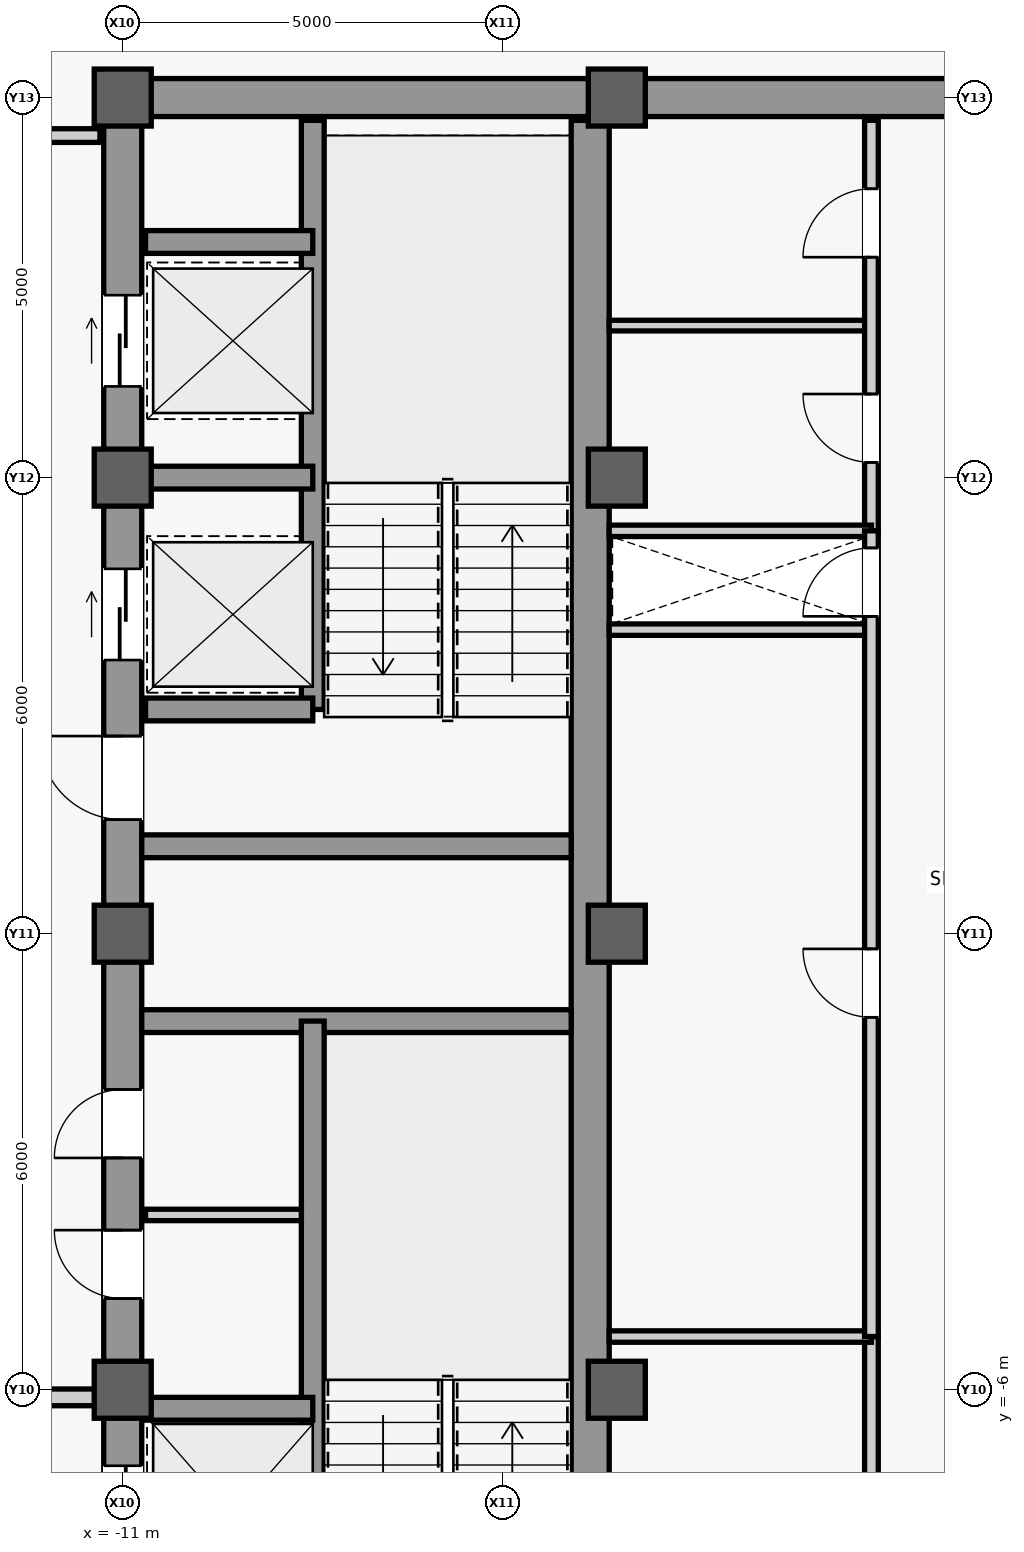
"""IFC4 building model, lengths in metres.
Left out: names, types, materials, properties, quantities, classifications, styles, units other than length and angle.
Written with IfcOpenShell. Run it as: python <this file> out.ifc"""

import sys

from ifc_helpers import new_model, si_unit, direction, frame, frame_2d, origin, origin_2d, place, context, subcontext, project, spatial, rectangle, extrude, source, transform, mapped, element, fill, save


model = new_model("IFC4")
c1 = context("Model", 3, precision=1e-05, world=origin(), true_north=direction((0.0, 1.0)))
c2 = subcontext(c1, "Body", "Model", "MODEL_VIEW")
j1 = project(units=[si_unit("LENGTHUNIT", "METRE"), si_unit("PLANEANGLEUNIT", "RADIAN")], contexts=[c1])
p1 = place(None, origin())
s1 = spatial("IfcSite", under=j1, at=p1, CompositionType="ELEMENT")
p2 = place(p1, origin())
s2 = spatial("IfcBuilding", under=s1, at=p2, CompositionType="ELEMENT")
p3 = place(p2, frame((0.0, 0.0, 342.3)))
s3 = spatial("IfcBuildingStorey", under=s2, at=p3, CompositionType="ELEMENT", Elevation=342.3)
m1 = source(origin(), c2, "Body", "SweptSolid", [
    extrude(rectangle(XDim=22.0, YDim=0.5, at=frame_2d((11.0, 0.0))), origin(), (0.0, 0.0, 1.0), 3.7),
])
p4 = place(p3, frame((-11.0, -11.0, 0.0), z_axis=(0.0, 0.0, 1.0), x_axis=(0.0, 1.0, 0.0)))
e1 = element("IfcWall", 1, at=p4, inside=s3, PredefinedType="SHEAR", context=c2, shape_type="MappedRepresentation", body=[
    mapped(m1, transform((0.0, 0.0, 0.0), scale=1.0)),
])
m2 = source(origin(), c2, "Body", "SweptSolid", [
    extrude(rectangle(XDim=1.1, YDim=2.2, at=frame_2d((0.55, 1.1))), frame((0.0, 0.26, 0.0), z_axis=(0.0, -1.0, 0.0), x_axis=(1.0, 0.0, 0.0)), (0.0, 0.0, 1.0), 0.52),
])
p5 = place(p4, frame((0.8, 0.0, 0.0)))
e2 = element("IfcOpeningElement", 2, at=p5, cuts=e1, PredefinedType="OPENING", context=c2, shape_type="MappedRepresentation", body=[
    mapped(m2, transform((0.0, 0.0, 0.0), scale=1.0)),
])
p6 = place(p4, frame((12.5, 0.0, 0.0)))
e3 = element("IfcOpeningElement", 3, at=p6, cuts=e1, PredefinedType="OPENING", context=c2, shape_type="MappedRepresentation", body=[
    mapped(m2, transform((0.0, 0.0, 0.0), scale=1.0)),
])
m3 = source(origin(), c2, "Body", "SweptSolid", [
    extrude(rectangle(XDim=0.9, YDim=2.15, at=frame_2d((0.45, 1.075))), frame((0.0, 0.26, 0.0), z_axis=(0.0, -1.0, 0.0), x_axis=(1.0, 0.0, 0.0)), (0.0, 0.0, 1.0), 0.52),
])
p7 = place(p4, frame((6.2, 0.0, 0.0)))
e4 = element("IfcOpeningElement", 4, at=p7, cuts=e1, PredefinedType="OPENING", context=c2, shape_type="MappedRepresentation", body=[
    mapped(m3, transform((0.0, 0.0, 0.0), scale=1.0)),
])
p8 = place(p4, frame((8.05, 0.0, 0.0)))
e5 = element("IfcOpeningElement", 5, at=p8, cuts=e1, PredefinedType="OPENING", context=c2, shape_type="MappedRepresentation", body=[
    mapped(m3, transform((0.0, 0.0, 0.0), scale=1.0)),
])
m4 = source(origin(), c2, "Body", "SweptSolid", [
    extrude(rectangle(XDim=1.2, YDim=2.3, at=frame_2d((0.6, 1.15))), frame((0.0, 0.26, 0.0), z_axis=(0.0, -1.0, 0.0), x_axis=(1.0, 0.0, 0.0)), (0.0, 0.0, 1.0), 0.52),
])
p9 = place(p4, frame((14.6, 0.0, 0.0)))
e6 = element("IfcOpeningElement", 6, at=p9, cuts=e1, PredefinedType="OPENING", context=c2, shape_type="MappedRepresentation", body=[
    mapped(m4, transform((0.0, 0.0, 0.0), scale=1.0)),
])
p10 = place(p4, frame((18.2, 0.0, 0.0)))
e7 = element("IfcOpeningElement", 7, at=p10, cuts=e1, PredefinedType="OPENING", context=c2, shape_type="MappedRepresentation", body=[
    mapped(m4, transform((0.0, 0.0, 0.0), scale=1.0)),
])
m5 = source(origin(), c2, "Body", "SweptSolid", [
    extrude(rectangle(XDim=1.3, YDim=2.3, at=frame_2d((0.65, 1.15))), frame((0.0, 0.26, 0.0), z_axis=(0.0, -1.0, 0.0), x_axis=(1.0, 0.0, 0.0)), (0.0, 0.0, 1.0), 0.52),
])
p11 = place(p4, frame((2.7, 0.0, 0.0)))
e8 = element("IfcOpeningElement", 8, at=p11, cuts=e1, PredefinedType="OPENING", context=c2, shape_type="MappedRepresentation", body=[
    mapped(m5, transform((0.0, 0.0, 0.0), scale=1.0)),
])
m6 = source(origin(), c2, "Body", "SweptSolid", [
    extrude(rectangle(XDim=21.4, YDim=0.5, at=frame_2d((10.7, 0.0))), origin(), (0.0, 0.0, 1.0), 3.7),
])
p12 = place(p3, frame((-4.85, -10.7, 0.0), z_axis=(0.0, 0.0, 1.0), x_axis=(0.0, 1.0, 0.0)))
e9 = element("IfcWall", 9, at=p12, inside=s3, PredefinedType="SHEAR", context=c2, shape_type="MappedRepresentation", body=[
    mapped(m6, transform((0.0, 0.0, 0.0), scale=1.0)),
])
m7 = source(origin(), c2, "Body", "SweptSolid", [
    extrude(rectangle(XDim=5.9, YDim=0.5, at=frame_2d((2.95, 0.0))), origin(), (0.0, 0.0, 1.0), 3.7),
])
p13 = place(p3, frame((-10.75, 11.0, 0.0), z_axis=(0.0, 0.0, 1.0), x_axis=(1.0, 0.0, 0.0)))
e10 = element("IfcWall", 10, at=p13, inside=s3, PredefinedType="SHEAR", context=c2, shape_type="MappedRepresentation", body=[
    mapped(m7, transform((0.0, 0.0, 0.0), scale=1.0)),
])
m8 = source(origin(), c2, "Body", "SweptSolid", [
    extrude(rectangle(XDim=5.65, YDim=0.3, at=frame_2d((2.825, 0.0))), origin(), (0.0, 0.0, 1.0), 3.7),
])
for number, where, z_axis, x_axis in (
    (11, (-10.75, -1.15, 0.0), (0.0, 0.0, 1.0), (1.0, 0.0, 0.0)),
    (12, (-10.75, 1.15, 0.0), (0.0, 0.0, 1.0), (1.0, 0.0, 0.0)),
):
    element("IfcWall", number, at=place(p3, frame(where, z_axis=z_axis, x_axis=x_axis)), inside=s3, PredefinedType="SHEAR", context=c2, shape_type="MappedRepresentation", body=[
        mapped(m8, transform((0.0, 0.0, 0.0), scale=1.0)),
    ])
m9 = source(origin(), c2, "Body", "SweptSolid", [
    extrude(rectangle(XDim=9.2, YDim=0.5, at=frame_2d((4.6, 0.0))), origin(), (0.0, 0.0, 1.0), 3.7),
])
p14 = place(p3, frame((-4.6, 11.0, 0.0), z_axis=(0.0, 0.0, 1.0), x_axis=(1.0, 0.0, 0.0)))
e13 = element("IfcWall", 13, at=p14, inside=s3, PredefinedType="SHEAR", context=c2, shape_type="MappedRepresentation", body=[
    mapped(m9, transform((0.0, 0.0, 0.0), scale=1.0)),
])
m10 = source(origin(), c2, "Body", "SweptSolid", [
    extrude(rectangle(XDim=0.75, YDim=0.75, at=origin_2d()), origin(), (0.0, 0.0, 1.0), 4.0),
])
for number, where, z_axis, x_axis in (
    (14, (-11.0, -6.0, 0.0), (0.0, 0.0, 1.0), (1.0, 0.0, 0.0)),
    (15, (-11.0, 0.0, 0.0), (0.0, 0.0, 1.0), (1.0, 0.0, 0.0)),
    (16, (-11.0, 6.0, 0.0), (0.0, 0.0, 1.0), (1.0, 0.0, 0.0)),
    (17, (-11.0, 11.0, 0.0), (0.0, 0.0, 1.0), (1.0, 0.0, 0.0)),
    (18, (-4.5, -6.0, 0.0), (0.0, 0.0, 1.0), (1.0, 0.0, 0.0)),
    (19, (-4.5, 0.0, 0.0), (0.0, 0.0, 1.0), (1.0, 0.0, 0.0)),
    (20, (-4.5, 6.0, 0.0), (0.0, 0.0, 1.0), (1.0, 0.0, 0.0)),
    (21, (-4.5, 11.0, 0.0), (0.0, 0.0, 1.0), (1.0, 0.0, 0.0)),
):
    element("IfcColumn", number, at=place(p3, frame(where, z_axis=z_axis, x_axis=x_axis)), inside=s3, PredefinedType="COLUMN", context=c2, shape_type="MappedRepresentation", body=[
        mapped(m10, transform((0.0, 0.0, 0.0), scale=1.0)),
    ])
m11 = source(origin(), c2, "Body", "SweptSolid", [
    extrude(rectangle(XDim=7.8, YDim=0.3, at=frame_2d((3.9, 0.0))), origin(), (0.0, 0.0, 1.0), 3.7),
])
p15 = place(p3, frame((-8.5, -8.95, 0.0), z_axis=(0.0, 0.0, 1.0), x_axis=(0.0, 1.0, 0.0)))
e22 = element("IfcWall", 22, at=p15, inside=s3, PredefinedType="SHEAR", context=c2, shape_type="MappedRepresentation", body=[
    mapped(m11, transform((0.0, 0.0, 0.0), scale=1.0)),
])
m12 = source(origin(), c2, "Body", "SweptSolid", [
    extrude(rectangle(XDim=2.2, YDim=0.3, at=frame_2d((1.1, 0.0))), origin(), (0.0, 0.0, 1.0), 3.7),
])
p16 = place(p3, frame((-10.7, -6.25, 0.0), z_axis=(0.0, 0.0, 1.0), x_axis=(1.0, 0.0, 0.0)))
e23 = element("IfcWall", 23, at=p16, inside=s3, PredefinedType="SHEAR", context=c2, shape_type="MappedRepresentation", body=[
    mapped(m12, transform((0.0, 0.0, 0.0), scale=1.0)),
])
m13 = source(origin(), c2, "Body", "SweptSolid", [
    extrude(rectangle(XDim=7.75, YDim=0.3, at=frame_2d((3.875, 0.0))), origin(), (0.0, 0.0, 1.0), 3.7),
])
p17 = place(p3, frame((-8.5, 2.95, 0.0), z_axis=(0.0, 0.0, 1.0), x_axis=(0.0, 1.0, 0.0)))
e24 = element("IfcWall", 24, at=p17, inside=s3, PredefinedType="SHEAR", context=c2, shape_type="MappedRepresentation", body=[
    mapped(m13, transform((0.0, 0.0, 0.0), scale=1.0)),
])
for number, where, z_axis, x_axis in (
    (25, (-10.7, 2.95, 0.0), (0.0, 0.0, 1.0), (1.0, 0.0, 0.0)),
    (26, (-10.7, 6.0, 0.0), (0.0, 0.0, 1.0), (1.0, 0.0, 0.0)),
    (27, (-10.7, 9.1, 0.0), (0.0, 0.0, 1.0), (1.0, 0.0, 0.0)),
):
    element("IfcWall", number, at=place(p3, frame(where, z_axis=z_axis, x_axis=x_axis)), inside=s3, PredefinedType="SHEAR", context=c2, shape_type="MappedRepresentation", body=[
        mapped(m12, transform((0.0, 0.0, 0.0), scale=1.0)),
    ])
m14 = source(origin(), c2, "Body", "SweptSolid", [
    extrude(rectangle(XDim=2.05, YDim=0.15, at=frame_2d((1.025, 0.0))), origin(), (0.0, 0.0, 1.0), 3.7),
])
p18 = place(p3, frame((-10.7, -3.7, 0.0), z_axis=(0.0, 0.0, 1.0), x_axis=(1.0, 0.0, 0.0)))
e28 = element("IfcWall", 28, at=p18, inside=s3, PredefinedType="PARTITIONING", context=c2, shape_type="MappedRepresentation", body=[
    mapped(m14, transform((0.0, 0.0, 0.0), scale=1.0)),
])
m15 = source(origin(), c2, "Body", "SweptSolid", [
    extrude(rectangle(XDim=4.05, YDim=0.22, at=frame_2d((2.025, 0.0))), origin(), (0.0, 0.0, 1.0), 3.084),
])
p19 = place(p3, frame((-15.35, -6.1, 0.0), z_axis=(0.0, 0.0, 1.0), x_axis=(1.0, 0.0, 0.0)))
e29 = element("IfcWall", 29, at=p19, inside=s3, PredefinedType="PARTITIONING", context=c2, shape_type="MappedRepresentation", body=[
    mapped(m15, transform((0.0, 0.0, 0.0), scale=1.0)),
])
m16 = source(origin(), c2, "Body", "SweptSolid", [
    extrude(rectangle(XDim=4.05, YDim=0.18, at=frame_2d((2.025, 0.0))), origin(), (0.0, 0.0, 1.0), 3.7),
])
p20 = place(p3, frame((-15.35, 10.5, 0.0), z_axis=(0.0, 0.0, 1.0), x_axis=(1.0, 0.0, 0.0)))
e30 = element("IfcWall", 30, at=p20, inside=s3, PredefinedType="PARTITIONING", context=c2, shape_type="MappedRepresentation", body=[
    mapped(m16, transform((0.0, 0.0, 0.0), scale=1.0)),
])
m17 = source(origin(), c2, "Body", "SweptSolid", [
    extrude(rectangle(XDim=3.45, YDim=0.15, at=frame_2d((1.725, 0.0))), origin(), (0.0, 0.0, 1.0), 3.7),
])
p21 = place(p3, frame((-4.6, 4.0, 0.0), z_axis=(0.0, 0.0, 1.0), x_axis=(1.0, 0.0, 0.0)))
e31 = element("IfcWall", 31, at=p21, inside=s3, PredefinedType="PARTITIONING", context=c2, shape_type="MappedRepresentation", body=[
    mapped(m17, transform((0.0, 0.0, 0.0), scale=1.0)),
])
m18 = source(origin(), c2, "Body", "SweptSolid", [
    extrude(rectangle(XDim=5.4, YDim=0.18, at=frame_2d((2.7, 0.0))), origin(), (0.0, 0.0, 1.0), 3.7),
])
p22 = place(p3, frame((-1.15, -10.7, 0.0), z_axis=(0.0, 0.0, 1.0), x_axis=(0.0, 1.0, 0.0)))
e32 = element("IfcWall", 32, at=p22, inside=s3, PredefinedType="PARTITIONING", context=c2, shape_type="MappedRepresentation", body=[
    mapped(m18, transform((0.0, 0.0, 0.0), scale=1.0)),
])
m19 = source(origin(), c2, "Body", "SweptSolid", [
    extrude(rectangle(XDim=0.9, YDim=2.15, at=frame_2d((0.45, 1.075))), frame((0.0, 0.1, 0.0), z_axis=(0.0, -1.0, 0.0), x_axis=(1.0, 0.0, 0.0)), (0.0, 0.0, 1.0), 0.2),
])
p23 = place(p22, frame((2.25, 0.0, 0.0)))
e33 = element("IfcOpeningElement", 33, at=p23, cuts=e32, PredefinedType="OPENING", context=c2, shape_type="MappedRepresentation", body=[
    mapped(m19, transform((0.0, 0.0, 0.0), scale=1.0)),
])
p24 = place(p3, frame((-4.6, -5.3, 0.0), z_axis=(0.0, 0.0, 1.0), x_axis=(1.0, 0.0, 0.0)))
e34 = element("IfcWall", 34, at=p24, inside=s3, PredefinedType="PARTITIONING", context=c2, shape_type="MappedRepresentation", body=[
    mapped(m17, transform((0.0, 0.0, 0.0), scale=1.0)),
])
m20 = source(origin(), c2, "Body", "SweptSolid", [
    extrude(rectangle(XDim=3.45, YDim=0.14, at=frame_2d((1.725, 0.0))), origin(), (0.0, 0.0, 1.0), 3.7),
])
p25 = place(p3, frame((-4.6, 8.0, 0.0), z_axis=(0.0, 0.0, 1.0), x_axis=(1.0, 0.0, 0.0)))
e35 = element("IfcWall", 35, at=p25, inside=s3, PredefinedType="PARTITIONING", context=c2, shape_type="MappedRepresentation", body=[
    mapped(m20, transform((0.0, 0.0, 0.0), scale=1.0)),
])
p26 = place(p3, frame((-1.15, 5.3, 0.0), z_axis=(0.0, 0.0, 1.0), x_axis=(0.0, 1.0, 0.0)))
e36 = element("IfcWall", 36, at=p26, inside=s3, PredefinedType="PARTITIONING", context=c2, shape_type="MappedRepresentation", body=[
    mapped(m18, transform((0.0, 0.0, 0.0), scale=1.0)),
])
p27 = place(p26, frame((0.9, 0.0, 0.0)))
e37 = element("IfcOpeningElement", 37, at=p27, cuts=e36, PredefinedType="OPENING", context=c2, shape_type="MappedRepresentation", body=[
    mapped(m19, transform((0.0, 0.0, 0.0), scale=1.0)),
])
p28 = place(p26, frame((3.6, 0.0, 0.0)))
e38 = element("IfcOpeningElement", 38, at=p28, cuts=e36, PredefinedType="OPENING", context=c2, shape_type="MappedRepresentation", body=[
    mapped(m19, transform((0.0, 0.0, 0.0), scale=1.0)),
])
p29 = place(p3, frame((-4.6, 5.3, 0.0), z_axis=(0.0, 0.0, 1.0), x_axis=(1.0, 0.0, 0.0)))
e39 = element("IfcWall", 39, at=p29, inside=s3, PredefinedType="PARTITIONING", context=c2, shape_type="MappedRepresentation", body=[
    mapped(m17, transform((0.0, 0.0, 0.0), scale=1.0)),
])
m21 = source(origin(), c2, "Body", "SweptSolid", [
    extrude(rectangle(XDim=10.6, YDim=0.18, at=frame_2d((5.3, 0.0))), origin(), (0.0, 0.0, 1.0), 3.7),
])
p30 = place(p3, frame((-1.15, -5.3, 0.0), z_axis=(0.0, 0.0, 1.0), x_axis=(0.0, 1.0, 0.0)))
e40 = element("IfcWall", 40, at=p30, inside=s3, PredefinedType="PARTITIONING", context=c2, shape_type="MappedRepresentation", body=[
    mapped(m21, transform((0.0, 0.0, 0.0), scale=1.0)),
])
p31 = place(p30, frame((4.2, 0.0, 0.0)))
e41 = element("IfcOpeningElement", 41, at=p31, cuts=e40, PredefinedType="OPENING", context=c2, shape_type="MappedRepresentation", body=[
    mapped(m19, transform((0.0, 0.0, 0.0), scale=1.0)),
])
p32 = place(p30, frame((9.475, 0.0, 0.0)))
e42 = element("IfcOpeningElement", 42, at=p32, cuts=e40, PredefinedType="OPENING", context=c2, shape_type="MappedRepresentation", body=[
    mapped(m19, transform((0.0, 0.0, 0.0), scale=1.0)),
])
m22 = source(origin(), c2, "Body", "SweptSolid", [
    extrude(rectangle(XDim=1.1, YDim=2.2, at=frame_2d((0.55, 1.1))), frame((0.0, 0.025, 0.0), z_axis=(0.0, -1.0, 0.0), x_axis=(1.0, 0.0, 0.0)), (0.0, 0.0, 1.0), 0.05),
])
p33 = place(p6, origin())
e43 = element("IfcDoor", 43, at=p33, inside=s3, OperationType="SINGLE_SWING_RIGHT", PredefinedType="DOOR", context=c2, shape_type="MappedRepresentation", body=[
    mapped(m22, transform((0.0, 0.0, 0.0), scale=1.0)),
])
fill(e3, e43)
m23 = source(origin(), c2, "Body", "SweptSolid", [
    extrude(rectangle(XDim=0.9, YDim=2.15, at=frame_2d((0.45, 1.075))), frame((0.0, 0.025, 0.0), z_axis=(0.0, -1.0, 0.0), x_axis=(1.0, 0.0, 0.0)), (0.0, 0.0, 1.0), 0.05),
])
p34 = place(p7, origin())
e44 = element("IfcDoor", 44, at=p34, inside=s3, OperationType="SINGLE_SWING_RIGHT", PredefinedType="DOOR", context=c2, shape_type="MappedRepresentation", body=[
    mapped(m23, transform((0.0, 0.0, 0.0), scale=1.0)),
])
fill(e4, e44)
p35 = place(p8, origin())
e45 = element("IfcDoor", 45, at=p35, inside=s3, OperationType="SINGLE_SWING_LEFT", PredefinedType="DOOR", context=c2, shape_type="MappedRepresentation", body=[
    mapped(m23, transform((0.0, 0.0, 0.0), scale=1.0)),
])
fill(e5, e45)
p36 = place(p27, origin())
e46 = element("IfcDoor", 46, at=p36, inside=s3, OperationType="SINGLE_SWING_RIGHT", PredefinedType="DOOR", context=c2, shape_type="MappedRepresentation", body=[
    mapped(m23, transform((0.0, 0.0, 0.0), scale=1.0)),
])
fill(e37, e46)
p37 = place(p28, origin())
e47 = element("IfcDoor", 47, at=p37, inside=s3, OperationType="SINGLE_SWING_LEFT", PredefinedType="DOOR", context=c2, shape_type="MappedRepresentation", body=[
    mapped(m23, transform((0.0, 0.0, 0.0), scale=1.0)),
])
fill(e38, e47)
p38 = place(p31, origin())
e48 = element("IfcDoor", 48, at=p38, inside=s3, OperationType="SINGLE_SWING_RIGHT", PredefinedType="DOOR", context=c2, shape_type="MappedRepresentation", body=[
    mapped(m23, transform((0.0, 0.0, 0.0), scale=1.0)),
])
fill(e41, e48)
p39 = place(p32, origin())
e49 = element("IfcDoor", 49, at=p39, inside=s3, OperationType="SINGLE_SWING_LEFT", PredefinedType="DOOR", context=c2, shape_type="MappedRepresentation", body=[
    mapped(m23, transform((0.0, 0.0, 0.0), scale=1.0)),
])
fill(e42, e49)
m24 = source(origin(), c2, "Body", "SweptSolid", [
    extrude(rectangle(XDim=1.2, YDim=2.3, at=frame_2d((0.6, 1.15))), frame((0.0, 0.025, 0.0), z_axis=(0.0, -1.0, 0.0), x_axis=(1.0, 0.0, 0.0)), (0.0, 0.0, 1.0), 0.05),
])
p40 = place(p9, origin())
e50 = element("IfcDoor", 50, at=p40, inside=s3, OperationType="SLIDING_TO_LEFT", PredefinedType="DOOR", context=c2, shape_type="MappedRepresentation", body=[
    mapped(m24, transform((0.0, 0.0, 0.0), scale=1.0)),
])
fill(e6, e50)
p41 = place(p10, origin())
e51 = element("IfcDoor", 51, at=p41, inside=s3, OperationType="SLIDING_TO_LEFT", PredefinedType="DOOR", context=c2, shape_type="MappedRepresentation", body=[
    mapped(m24, transform((0.0, 0.0, 0.0), scale=1.0)),
])
fill(e7, e51)
m25 = source(origin(), c2, "Body", "SweptSolid", [
    extrude(rectangle(XDim=1.3, YDim=2.3, at=frame_2d((0.65, 1.15))), frame((0.0, 0.025, 0.0), z_axis=(0.0, -1.0, 0.0), x_axis=(1.0, 0.0, 0.0)), (0.0, 0.0, 1.0), 0.05),
])
p42 = place(p11, origin())
e52 = element("IfcDoor", 52, at=p42, inside=s3, OperationType="SLIDING_TO_LEFT", PredefinedType="DOOR", context=c2, shape_type="MappedRepresentation", body=[
    mapped(m25, transform((0.0, 0.0, 0.0), scale=1.0)),
])
fill(e8, e52)
save(model, sys.argv[1])
